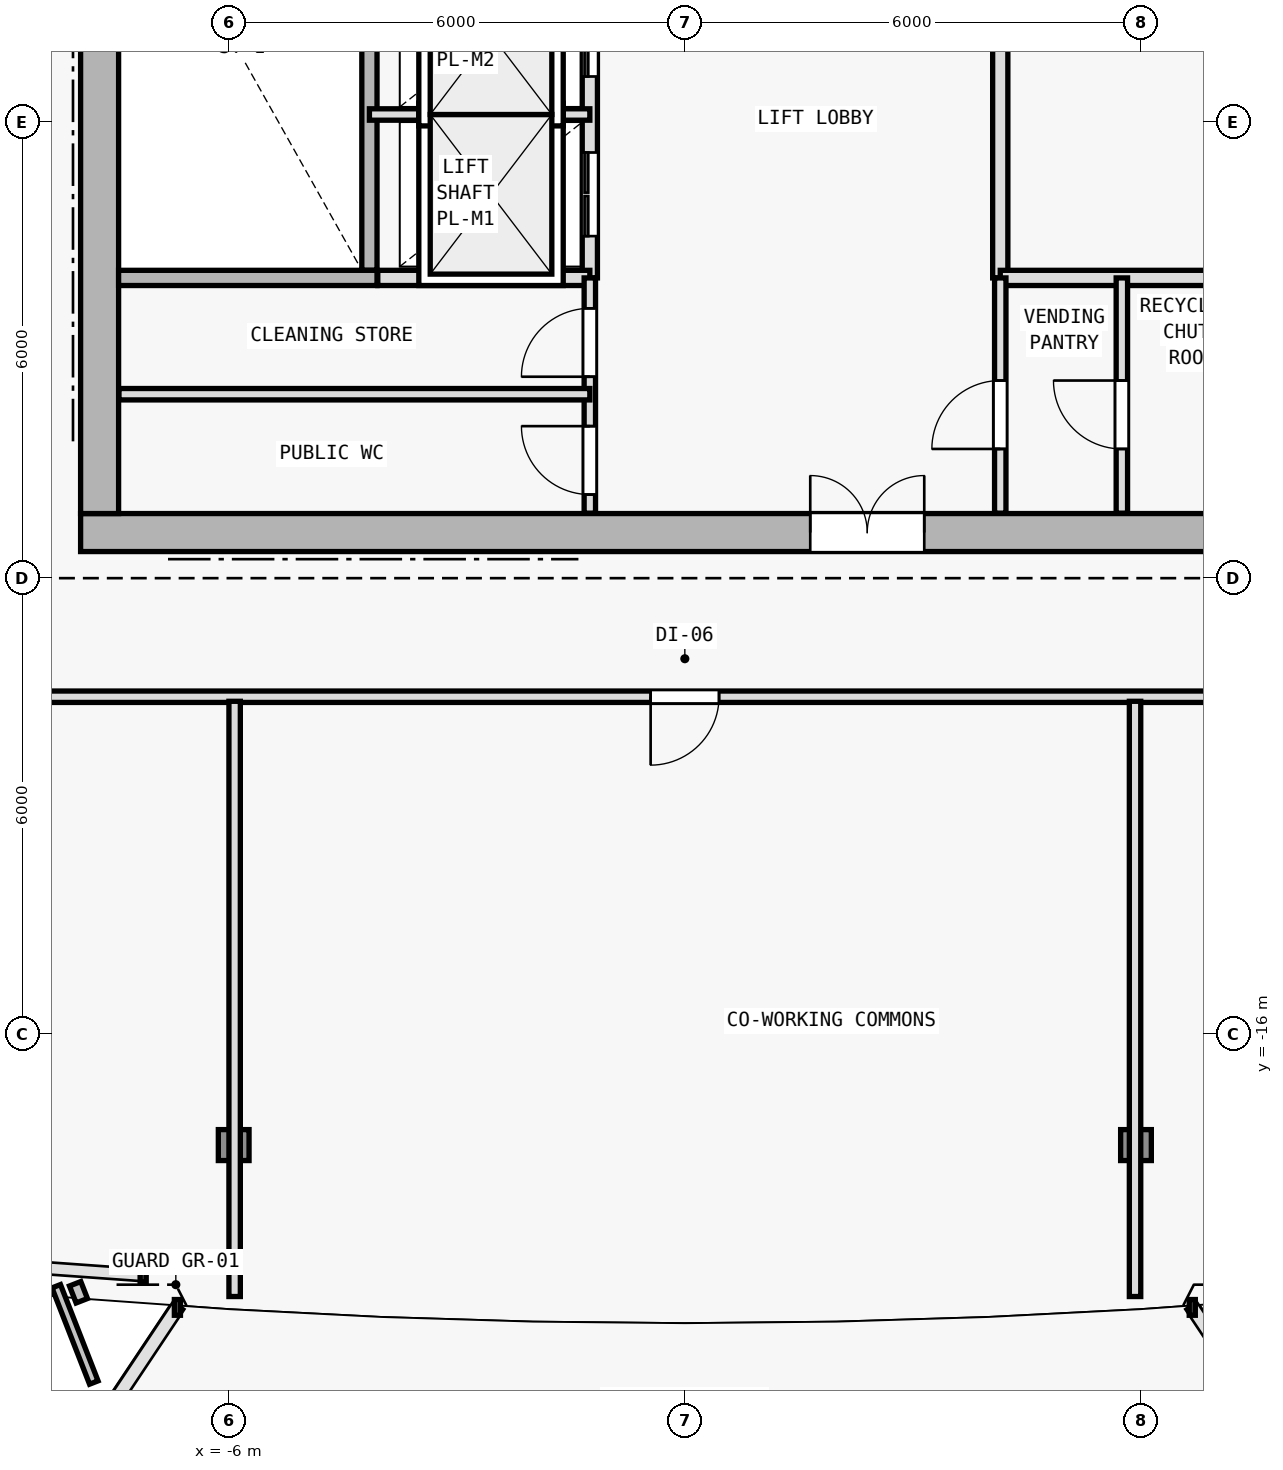
"""IFC4 building model, lengths in metres.
Left out: names, types, materials, properties, quantities, classifications, styles, units other than length and angle.
Written with IfcOpenShell. Run it as: python <this file> out.ifc"""

import sys

from ifc_helpers import new_model, si_unit, direction, frame, frame_2d, origin, origin_2d, place, context, subcontext, project, spatial, rectangle, i_section, extrude, element, fill, save


model = new_model("IFC4")
c1 = context("Model", 3, precision=1e-05, world=origin(), true_north=direction((0.0, 1.0)))
c2 = subcontext(c1, "Body", "Model", "MODEL_VIEW")
j1 = project(units=[si_unit("LENGTHUNIT", "METRE"), si_unit("PLANEANGLEUNIT", "RADIAN")], contexts=[c1])
p1 = place(None, origin())
s1 = spatial("IfcSite", under=j1, at=p1, CompositionType="ELEMENT")
p2 = place(p1, origin())
s2 = spatial("IfcBuilding", under=s1, at=p2, CompositionType="ELEMENT")
p3 = place(p2, frame((0.0, 0.0, 160.2)))
s3 = spatial("IfcBuildingStorey", under=s2, at=p3, CompositionType="ELEMENT", Elevation=160.2)
for number, where, z_axis, x_axis in (
    (1, (-7.7, -9.4, 0.0), (0.0, 0.0, 1.0), (1.0, 0.0, 0.0)),
    (2, (0.0, -9.4, 0.0), (0.0, 0.0, 1.0), (1.0, 0.0, 0.0)),
):
    element("IfcColumn", number, at=place(p3, frame(where, z_axis=z_axis, x_axis=x_axis)), inside=s3, PredefinedType="COLUMN", context=c2, shape_type="SweptSolid", body=[
        extrude(i_section(OverallWidth=0.404, OverallDepth=0.407, WebThickness=0.017, FlangeThickness=0.028, FilletRadius=0.015, at=origin_2d()), origin(), (0.0, 0.0, 1.0), 3.6),
    ])
for number, where, z_axis, x_axis in (
    (3, (-5.936, -17.458, 0.006), (0.007, 0.035, 0.999), (-0.981, 0.193, 0.0)),
    (4, (5.936, -17.458, 0.006), (-0.007, 0.035, 0.999), (-0.981, -0.193, 0.0)),
):
    element("IfcColumn", number, at=place(p3, frame(where, z_axis=z_axis, x_axis=x_axis)), inside=s3, PredefinedType="COLUMN", context=c2, shape_type="SweptSolid", body=[
        extrude(i_section(OverallWidth=0.404, OverallDepth=0.407, WebThickness=0.017, FlangeThickness=0.028, FilletRadius=0.015, at=origin_2d()), origin(), (0.0, 0.0, 1.0), 3.591),
    ])
p4 = place(p3, frame((-7.95, -9.4, 0.0), z_axis=(0.0, 0.0, 1.0), x_axis=(1.0, 0.0, 0.0)))
e5 = element("IfcWall", 5, at=p4, inside=s3, PredefinedType="SHEAR", context=c2, shape_type="SweptSolid", body=[
    extrude(rectangle(XDim=15.9, YDim=0.5, at=frame_2d((7.95, 0.0))), origin(), (0.0, 0.0, 1.0), 3.35),
])
p5 = place(p4, frame((9.6, 0.0, 0.0)))
e6 = element("IfcOpeningElement", 6, at=p5, cuts=e5, PredefinedType="OPENING", context=c2, shape_type="SweptSolid", body=[
    extrude(rectangle(XDim=1.5, YDim=2.2, at=frame_2d((0.75, 1.1))), frame((0.0, 0.26, 0.0), z_axis=(0.0, -1.0, 0.0), x_axis=(1.0, 0.0, 0.0)), (0.0, 0.0, 1.0), 0.52),
])
p6 = place(p3, frame((-7.7, -9.15, 0.0), z_axis=(0.0, 0.0, 1.0), x_axis=(0.0, 1.0, 0.0)))
e7 = element("IfcWall", 7, at=p6, inside=s3, PredefinedType="SHEAR", context=c2, shape_type="SweptSolid", body=[
    extrude(rectangle(XDim=19.1, YDim=0.5, at=frame_2d((9.55, 0.0))), origin(), (0.0, 0.0, 1.0), 3.35),
])
p7 = place(p6, frame((12.7, 0.0, 0.0)))
e8 = element("IfcOpeningElement", 8, at=p7, cuts=e7, PredefinedType="OPENING", context=c2, shape_type="SweptSolid", body=[
    extrude(rectangle(XDim=1.1, YDim=2.15, at=frame_2d((0.55, 1.075))), frame((0.0, 0.26, 0.0), z_axis=(0.0, -1.0, 0.0), x_axis=(1.0, 0.0, 0.0)), (0.0, 0.0, 1.0), 0.52),
])
p8 = place(p3, frame((-4.15, -5.95, 0.0), z_axis=(0.0, 0.0, 1.0), x_axis=(0.0, 1.0, 0.0)))
e9 = element("IfcWall", 9, at=p8, inside=s3, PredefinedType="SOLIDWALL", context=c2, shape_type="SweptSolid", body=[
    extrude(rectangle(XDim=7.2, YDim=0.2, at=frame_2d((3.6, 0.0))), origin(), (0.0, 0.0, 1.0), 3.35),
])
p9 = place(p3, frame((4.15, -6.05, 0.0), z_axis=(0.0, 0.0, 1.0), x_axis=(0.0, 1.0, 0.0)))
e10 = element("IfcWall", 10, at=p9, inside=s3, PredefinedType="SOLIDWALL", context=c2, shape_type="SweptSolid", body=[
    extrude(rectangle(XDim=8.7, YDim=0.2, at=frame_2d((4.35, 0.0))), origin(), (0.0, 0.0, 1.0), 3.35),
])
p10 = place(p9, frame((3.6, 0.0, 0.0)))
e11 = element("IfcOpeningElement", 11, at=p10, cuts=e10, PredefinedType="OPENING", context=c2, shape_type="SweptSolid", body=[
    extrude(rectangle(XDim=0.95, YDim=2.1, at=frame_2d((0.475, 1.05))), frame((0.0, 0.11, 0.0), z_axis=(0.0, -1.0, 0.0), x_axis=(1.0, 0.0, 0.0)), (0.0, 0.0, 1.0), 0.22),
])
p11 = place(p3, frame((-1.25, -6.05, 0.0), z_axis=(0.0, 0.0, 1.0), x_axis=(0.0, 1.0, 0.0)))
e12 = element("IfcWall", 12, at=p11, inside=s3, PredefinedType="SOLIDWALL", context=c2, shape_type="SweptSolid", body=[
    extrude(rectangle(XDim=8.7, YDim=0.2, at=frame_2d((4.35, 0.0))), origin(), (0.0, 0.0, 1.0), 3.35),
])
p12 = place(p11, frame((0.55, 0.0, 0.0)))
e13 = element("IfcOpeningElement", 13, at=p12, cuts=e12, PredefinedType="OPENING", context=c2, shape_type="SweptSolid", body=[
    extrude(rectangle(XDim=1.1, YDim=2.15, at=frame_2d((0.55, 1.075))), frame((0.0, 0.11, 0.0), z_axis=(0.0, -1.0, 0.0), x_axis=(1.0, 0.0, 0.0)), (0.0, 0.0, 1.0), 0.22),
])
p13 = place(p11, frame((2.65, 0.0, 0.0)))
e14 = element("IfcOpeningElement", 14, at=p13, cuts=e12, PredefinedType="OPENING", context=c2, shape_type="SweptSolid", body=[
    extrude(rectangle(XDim=1.1, YDim=2.15, at=frame_2d((0.55, 1.075))), frame((0.0, 0.11, 0.0), z_axis=(0.0, -1.0, 0.0), x_axis=(1.0, 0.0, 0.0)), (0.0, 0.0, 1.0), 0.22),
])
p14 = place(p11, frame((4.75, 0.0, 0.0)))
e15 = element("IfcOpeningElement", 15, at=p14, cuts=e12, PredefinedType="OPENING", context=c2, shape_type="SweptSolid", body=[
    extrude(rectangle(XDim=1.1, YDim=2.15, at=frame_2d((0.55, 1.075))), frame((0.0, 0.11, 0.0), z_axis=(0.0, -1.0, 0.0), x_axis=(1.0, 0.0, 0.0)), (0.0, 0.0, 1.0), 0.22),
])
p15 = place(p11, frame((6.85, 0.0, 0.0)))
e16 = element("IfcOpeningElement", 16, at=p15, cuts=e12, PredefinedType="OPENING", context=c2, shape_type="SweptSolid", body=[
    extrude(rectangle(XDim=1.1, YDim=2.15, at=frame_2d((0.55, 1.075))), frame((0.0, 0.11, 0.0), z_axis=(0.0, -1.0, 0.0), x_axis=(1.0, 0.0, 0.0)), (0.0, 0.0, 1.0), 0.22),
])
p16 = place(p3, frame((-4.15, -3.9, 0.0), z_axis=(0.0, 0.0, 1.0), x_axis=(1.0, 0.0, 0.0)))
e17 = element("IfcWall", 17, at=p16, inside=s3, PredefinedType="PARTITIONING", context=c2, shape_type="SweptSolid", body=[
    extrude(rectangle(XDim=2.9, YDim=0.15, at=frame_2d((1.45, 0.0))), origin(), (0.0, 0.0, 1.0), 3.35),
])
p17 = place(p3, frame((-7.45, -6.05, 0.0), z_axis=(0.0, 0.0, 1.0), x_axis=(1.0, 0.0, 0.0)))
e18 = element("IfcWall", 18, at=p17, inside=s3, PredefinedType="SOLIDWALL", context=c2, shape_type="SweptSolid", body=[
    extrude(rectangle(XDim=3.4, YDim=0.2, at=frame_2d((1.7, 0.0))), origin(), (0.0, 0.0, 1.0), 3.35),
])
p18 = place(p3, frame((-4.04, -6.05, 0.0), z_axis=(0.0, 0.0, 1.0), x_axis=(1.0, 0.0, 0.0)))
e19 = element("IfcWall", 19, at=p18, inside=s3, PredefinedType="SOLIDWALL", context=c2, shape_type="SweptSolid", body=[
    extrude(rectangle(XDim=2.79, YDim=0.2, at=frame_2d((1.395, 0.0))), origin(), (0.0, 0.0, 1.0), 3.35),
])
p19 = place(p3, frame((4.15, -6.05, 0.0), z_axis=(0.0, 0.0, 1.0), x_axis=(1.0, 0.0, 0.0)))
e20 = element("IfcWall", 20, at=p19, inside=s3, PredefinedType="SOLIDWALL", context=c2, shape_type="SweptSolid", body=[
    extrude(rectangle(XDim=3.295, YDim=0.2, at=frame_2d((1.647, 0.0))), origin(), (0.0, 0.0, 1.0), 3.35),
])
p20 = place(p3, frame((-1.25, -9.145, 0.0), z_axis=(0.0, 0.0, 1.0), x_axis=(0.0, 1.0, 0.0)))
e21 = element("IfcWall", 21, at=p20, inside=s3, PredefinedType="PARTITIONING", context=c2, shape_type="SweptSolid", body=[
    extrude(rectangle(XDim=3.095, YDim=0.15, at=frame_2d((1.547, 0.0))), origin(), (0.0, 0.0, 1.0), 3.35),
])
p21 = place(p20, frame((1.795, 0.0, 0.0)))
e22 = element("IfcOpeningElement", 22, at=p21, cuts=e21, PredefinedType="OPENING", context=c2, shape_type="SweptSolid", body=[
    extrude(rectangle(XDim=0.9, YDim=2.1, at=frame_2d((0.45, 1.05))), frame((0.0, 0.085, 0.0), z_axis=(0.0, -1.0, 0.0), x_axis=(1.0, 0.0, 0.0)), (0.0, 0.0, 1.0), 0.17),
])
p22 = place(p20, frame((0.245, 0.0, 0.0)))
e23 = element("IfcOpeningElement", 23, at=p22, cuts=e21, PredefinedType="OPENING", context=c2, shape_type="SweptSolid", body=[
    extrude(rectangle(XDim=0.9, YDim=2.1, at=frame_2d((0.45, 1.05))), frame((0.0, 0.085, 0.0), z_axis=(0.0, -1.0, 0.0), x_axis=(1.0, 0.0, 0.0)), (0.0, 0.0, 1.0), 0.17),
])
p23 = place(p3, frame((4.15, -9.145, 0.0), z_axis=(0.0, 0.0, 1.0), x_axis=(0.0, 1.0, 0.0)))
e24 = element("IfcWall", 24, at=p23, inside=s3, PredefinedType="PARTITIONING", context=c2, shape_type="SweptSolid", body=[
    extrude(rectangle(XDim=3.095, YDim=0.15, at=frame_2d((1.547, 0.0))), origin(), (0.0, 0.0, 1.0), 3.35),
])
p24 = place(p23, frame((0.845, 0.0, 0.0)))
e25 = element("IfcOpeningElement", 25, at=p24, cuts=e24, PredefinedType="OPENING", context=c2, shape_type="SweptSolid", body=[
    extrude(rectangle(XDim=0.9, YDim=2.1, at=frame_2d((0.45, 1.05))), frame((0.0, 0.085, 0.0), z_axis=(0.0, -1.0, 0.0), x_axis=(1.0, 0.0, 0.0)), (0.0, 0.0, 1.0), 0.17),
])
p25 = place(p3, frame((-7.445, -7.58, 0.0), z_axis=(0.0, 0.0, 1.0), x_axis=(1.0, 0.0, 0.0)))
e26 = element("IfcWall", 26, at=p25, inside=s3, PredefinedType="PARTITIONING", context=c2, shape_type="SweptSolid", body=[
    extrude(rectangle(XDim=6.195, YDim=0.15, at=frame_2d((3.098, 0.0))), origin(), (0.0, 0.0, 1.0), 3.35),
])
p26 = place(p3, frame((5.75, -9.145, 0.0), z_axis=(0.0, 0.0, 1.0), x_axis=(0.0, 1.0, 0.0)))
e27 = element("IfcWall", 27, at=p26, inside=s3, PredefinedType="PARTITIONING", context=c2, shape_type="SweptSolid", body=[
    extrude(rectangle(XDim=3.095, YDim=0.15, at=frame_2d((1.547, 0.0))), origin(), (0.0, 0.0, 1.0), 3.35),
])
p27 = place(p26, frame((0.845, 0.0, 0.0)))
e28 = element("IfcOpeningElement", 28, at=p27, cuts=e27, PredefinedType="OPENING", context=c2, shape_type="SweptSolid", body=[
    extrude(rectangle(XDim=0.9, YDim=2.1, at=frame_2d((0.45, 1.05))), frame((0.0, 0.085, 0.0), z_axis=(0.0, -1.0, 0.0), x_axis=(1.0, 0.0, 0.0)), (0.0, 0.0, 1.0), 0.17),
])
p28 = place(p3, frame((13.18, -11.56, 0.0), z_axis=(0.0, 0.0, 1.0), x_axis=(-1.0, 0.0, 0.0)))
e29 = element("IfcWall", 29, at=p28, inside=s3, PredefinedType="PARTITIONING", context=c2, shape_type="SweptSolid", body=[
    extrude(rectangle(XDim=23.04, YDim=0.15, at=frame_2d((11.52, 0.0))), origin(), (0.0, 0.0, 1.0), 2.825),
])
p29 = place(p28, frame((12.73, 0.0, 0.0)))
e30 = element("IfcOpeningElement", 30, at=p29, cuts=e29, PredefinedType="OPENING", context=c2, shape_type="SweptSolid", body=[
    extrude(rectangle(XDim=0.9, YDim=2.1, at=frame_2d((0.45, 1.05))), frame((0.0, 0.085, 0.0), z_axis=(0.0, -1.0, 0.0), x_axis=(1.0, 0.0, 0.0)), (0.0, 0.0, 1.0), 0.17),
])
p30 = place(p28, frame((3.267, 0.0, 0.0)))
e31 = element("IfcOpeningElement", 31, at=p30, cuts=e29, PredefinedType="OPENING", context=c2, shape_type="SweptSolid", body=[
    extrude(rectangle(XDim=0.9, YDim=2.1, at=frame_2d((0.45, 1.05))), frame((0.0, 0.085, 0.0), z_axis=(0.0, -1.0, 0.0), x_axis=(1.0, 0.0, 0.0)), (0.0, 0.0, 1.0), 0.17),
])
for number, where, z_axis, x_axis in (
    (32, (-5.923, -11.62, 0.0), (0.0, 0.0, 1.0), (0.0, -1.0, 0.0)),
    (33, (5.923, -11.62, 0.0), (0.0, 0.0, 1.0), (0.0, -1.0, 0.0)),
):
    element("IfcWall", number, at=place(p3, frame(where, z_axis=z_axis, x_axis=x_axis)), inside=s3, PredefinedType="PARTITIONING", context=c2, shape_type="SweptSolid", body=[
        extrude(rectangle(XDim=7.831, YDim=0.15, at=frame_2d((3.916, 0.0))), origin(), (0.0, 0.0, 1.0), 2.775),
    ])
p31 = place(p5, origin())
e34 = element("IfcDoor", 34, at=p31, inside=s3, OperationType="DOUBLE_DOOR_SINGLE_SWING", PredefinedType="DOOR", context=c2, shape_type="SweptSolid", body=[
    extrude(rectangle(XDim=1.5, YDim=2.2, at=frame_2d((0.75, 1.1))), frame((0.0, 0.025, 0.0), z_axis=(0.0, -1.0, 0.0), x_axis=(1.0, 0.0, 0.0)), (0.0, 0.0, 1.0), 0.05),
])
fill(e6, e34)
p32 = place(p12, origin())
e35 = element("IfcDoor", 35, at=p32, inside=s3, OperationType="DOUBLE_DOOR_SLIDING", PredefinedType="DOOR", context=c2, shape_type="SweptSolid", body=[
    extrude(rectangle(XDim=1.1, YDim=2.15, at=frame_2d((0.55, 1.075))), frame((0.0, 0.025, 0.0), z_axis=(0.0, -1.0, 0.0), x_axis=(1.0, 0.0, 0.0)), (0.0, 0.0, 1.0), 0.05),
])
fill(e13, e35)
p33 = place(p13, origin())
e36 = element("IfcDoor", 36, at=p33, inside=s3, OperationType="DOUBLE_DOOR_SLIDING", PredefinedType="DOOR", context=c2, shape_type="SweptSolid", body=[
    extrude(rectangle(XDim=1.1, YDim=2.15, at=frame_2d((0.55, 1.075))), frame((0.0, 0.025, 0.0), z_axis=(0.0, -1.0, 0.0), x_axis=(1.0, 0.0, 0.0)), (0.0, 0.0, 1.0), 0.05),
])
fill(e14, e36)
p34 = place(p21, origin())
e37 = element("IfcDoor", 37, at=p34, inside=s3, OperationType="SINGLE_SWING_LEFT", PredefinedType="DOOR", context=c2, shape_type="SweptSolid", body=[
    extrude(rectangle(XDim=0.9, YDim=2.1, at=frame_2d((0.45, 1.05))), frame((0.0, 0.025, 0.0), z_axis=(0.0, -1.0, 0.0), x_axis=(1.0, 0.0, 0.0)), (0.0, 0.0, 1.0), 0.05),
])
fill(e22, e37)
p35 = place(p22, origin())
e38 = element("IfcDoor", 38, at=p35, inside=s3, OperationType="SINGLE_SWING_RIGHT", PredefinedType="DOOR", context=c2, shape_type="SweptSolid", body=[
    extrude(rectangle(XDim=0.9, YDim=2.1, at=frame_2d((0.45, 1.05))), frame((0.0, 0.025, 0.0), z_axis=(0.0, -1.0, 0.0), x_axis=(1.0, 0.0, 0.0)), (0.0, 0.0, 1.0), 0.05),
])
fill(e23, e38)
p36 = place(p24, origin())
e39 = element("IfcDoor", 39, at=p36, inside=s3, OperationType="SINGLE_SWING_LEFT", PredefinedType="DOOR", context=c2, shape_type="SweptSolid", body=[
    extrude(rectangle(XDim=0.9, YDim=2.1, at=frame_2d((0.45, 1.05))), frame((0.0, 0.025, 0.0), z_axis=(0.0, -1.0, 0.0), x_axis=(1.0, 0.0, 0.0)), (0.0, 0.0, 1.0), 0.05),
])
fill(e25, e39)
p37 = place(p27, origin())
e40 = element("IfcDoor", 40, at=p37, inside=s3, OperationType="SINGLE_SWING_RIGHT", PredefinedType="DOOR", context=c2, shape_type="SweptSolid", body=[
    extrude(rectangle(XDim=0.9, YDim=2.1, at=frame_2d((0.45, 1.05))), frame((0.0, 0.025, 0.0), z_axis=(0.0, -1.0, 0.0), x_axis=(1.0, 0.0, 0.0)), (0.0, 0.0, 1.0), 0.05),
])
fill(e28, e40)
p38 = place(p29, origin())
e41 = element("IfcDoor", 41, at=p38, inside=s3, OperationType="SINGLE_SWING_RIGHT", PredefinedType="DOOR", context=c2, shape_type="SweptSolid", body=[
    extrude(rectangle(XDim=0.9, YDim=2.1, at=frame_2d((0.45, 1.05))), frame((0.0, 0.025, 0.0), z_axis=(0.0, -1.0, 0.0), x_axis=(1.0, 0.0, 0.0)), (0.0, 0.0, 1.0), 0.05),
])
fill(e30, e41)
save(model, sys.argv[1])
